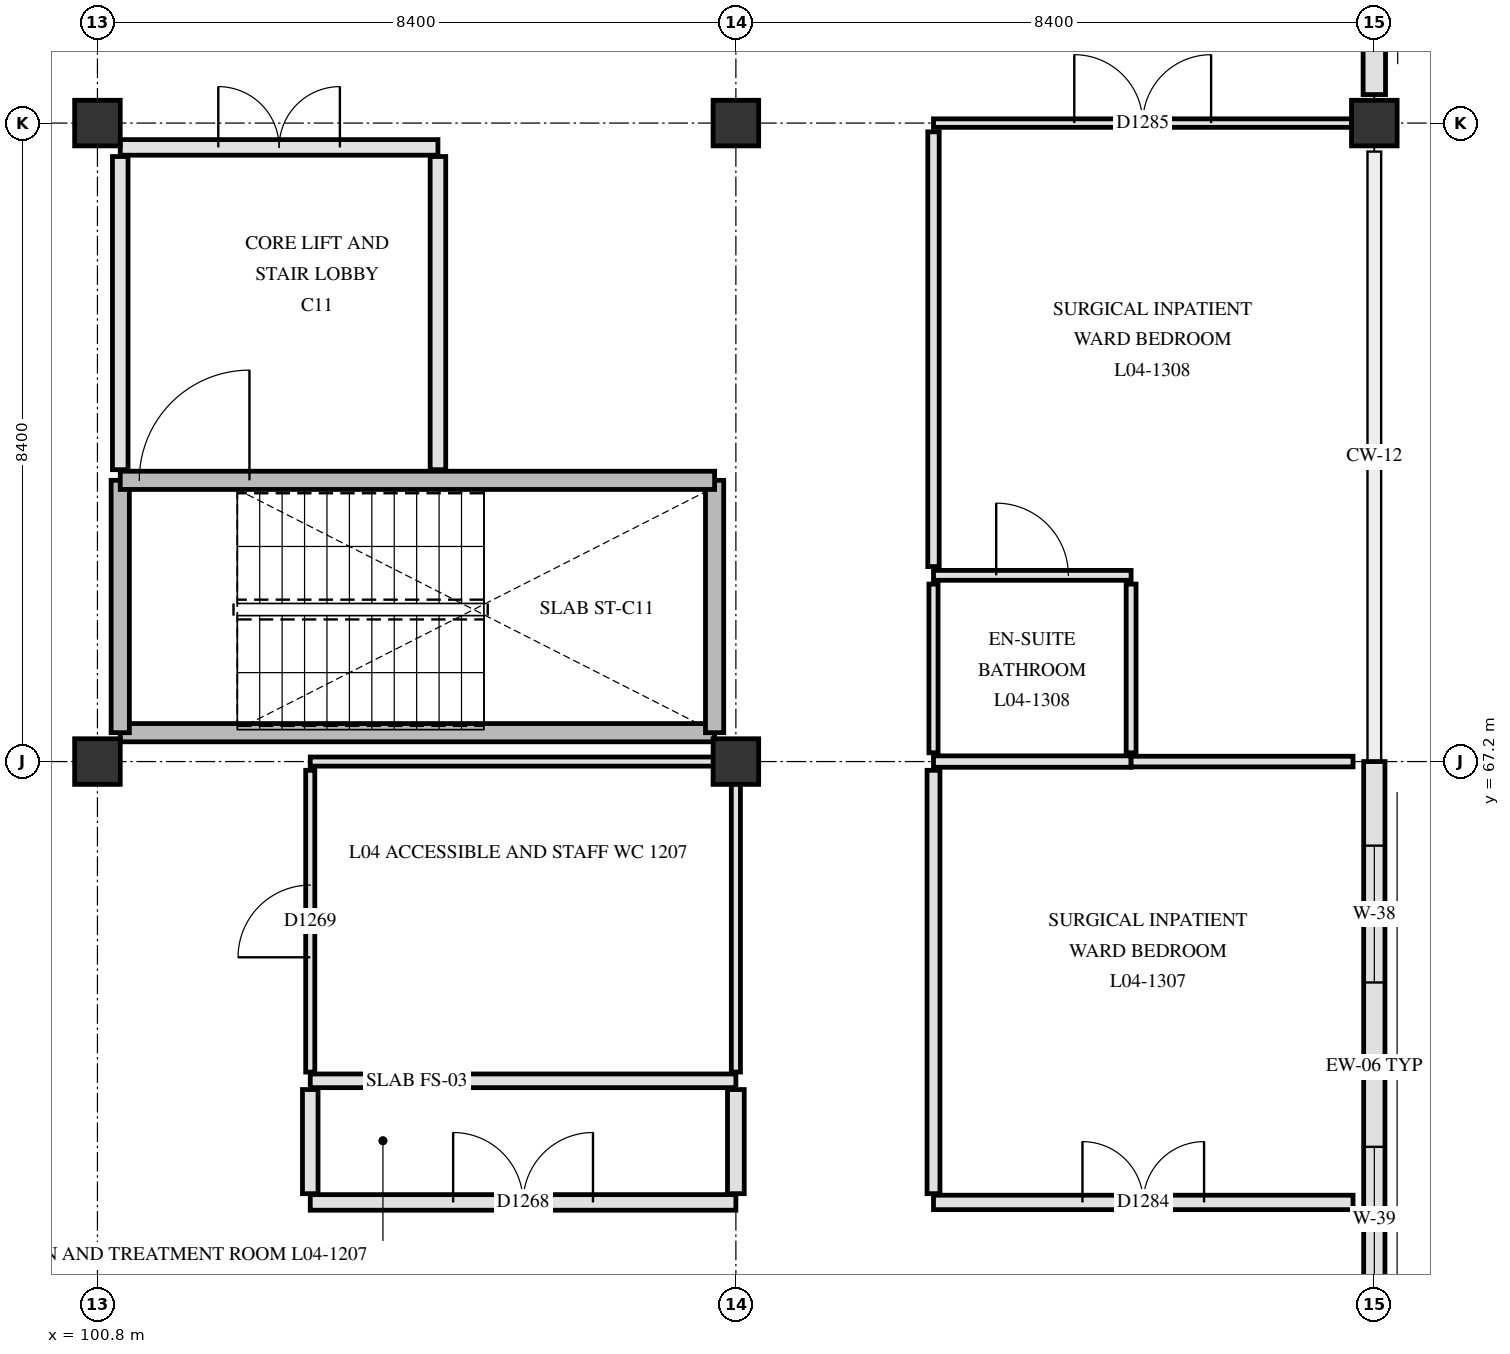
"""IFC4 building model, lengths in metres.
Left out: names, types, materials, properties, quantities, classifications, styles, units other than length and angle.
Written with IfcOpenShell. Run it as: python <this file> out.ifc"""

import sys

from ifc_helpers import new_model, si_unit, direction, frame, frame_2d, origin, origin_2d, place, context, subcontext, project, spatial, rectangle, extrude, element, fill, save


model = new_model("IFC4")
c1 = context("Model", 3, precision=1e-05, world=origin(), true_north=direction((0.0, 1.0)))
c2 = subcontext(c1, "Body", "Model", "MODEL_VIEW")
j1 = project(units=[si_unit("LENGTHUNIT", "METRE"), si_unit("PLANEANGLEUNIT", "RADIAN")], contexts=[c1])
p1 = place(None, origin())
s1 = spatial("IfcSite", under=j1, at=p1, CompositionType="ELEMENT")
p2 = place(p1, origin())
s2 = spatial("IfcBuilding", under=s1, at=p2, CompositionType="ELEMENT")
p3 = place(p2, frame((0.0, 0.0, 18.6)))
s3 = spatial("IfcBuildingStorey", under=s2, at=p3, CompositionType="ELEMENT", Elevation=18.6)
for number, where, z_axis, x_axis in (
    (1, (100.8, 67.2, 0.0), (0.0, 0.0, 1.0), (1.0, 0.0, 0.0)),
    (2, (100.8, 75.6, 0.0), (0.0, 0.0, 1.0), (1.0, 0.0, 0.0)),
    (3, (109.2, 67.2, 0.0), (0.0, 0.0, 1.0), (1.0, 0.0, 0.0)),
    (4, (109.2, 75.6, 0.0), (0.0, 0.0, 1.0), (1.0, 0.0, 0.0)),
    (5, (117.6, 75.6, 0.0), (0.0, 0.0, 1.0), (1.0, 0.0, 0.0)),
):
    element("IfcColumn", number, at=place(p3, frame(where, z_axis=z_axis, x_axis=x_axis)), inside=s3, PredefinedType="COLUMN", context=c2, shape_type="SweptSolid", body=[
        extrude(rectangle(XDim=0.6, YDim=0.6, at=origin_2d()), origin(), (0.0, 0.0, 1.0), 3.9),
    ])
p4 = place(p3, frame((117.6, 83.625, 0.0), z_axis=(0.0, 0.0, 1.0), x_axis=(0.0, -1.0, 0.0)))
e6 = element("IfcWall", 6, at=p4, inside=s3, PredefinedType="SOLIDWALL", context=c2, shape_type="SweptSolid", body=[
    extrude(rectangle(XDim=7.65, YDim=0.295, at=frame_2d((3.825, 0.0))), origin(), (0.0, 0.0, 1.0), 3.31),
])
p5 = place(p4, frame((1.113, 0.0, 0.85)))
e7 = element("IfcOpeningElement", 7, at=p5, cuts=e6, PredefinedType="OPENING", context=c2, shape_type="SweptSolid", body=[
    extrude(rectangle(XDim=1.6, YDim=1.66, at=frame_2d((0.8, 0.83))), frame((0.0, 0.157, 0.0), z_axis=(0.0, -1.0, 0.0), x_axis=(1.0, 0.0, 0.0)), (0.0, 0.0, 1.0), 0.315),
])
p6 = place(p4, frame((4.887, 0.0, 0.85)))
e8 = element("IfcOpeningElement", 8, at=p6, cuts=e6, PredefinedType="OPENING", context=c2, shape_type="SweptSolid", body=[
    extrude(rectangle(XDim=1.7, YDim=1.66, at=frame_2d((0.85, 0.83))), frame((0.0, 0.157, 0.0), z_axis=(0.0, -1.0, 0.0), x_axis=(1.0, 0.0, 0.0)), (0.0, 0.0, 1.0), 0.315),
])
p7 = place(p3, frame((117.6, 67.2, 0.0), z_axis=(0.0, 0.0, 1.0), x_axis=(0.0, -1.0, 0.0)))
e9 = element("IfcWall", 9, at=p7, inside=s3, PredefinedType="SOLIDWALL", context=c2, shape_type="SweptSolid", body=[
    extrude(rectangle(XDim=8.025, YDim=0.28, at=frame_2d((4.012, 0.0))), origin(), (0.0, 0.0, 1.0), 3.11),
])
p8 = place(p7, frame((1.106, 0.0, 0.85)))
e10 = element("IfcOpeningElement", 10, at=p8, cuts=e9, PredefinedType="OPENING", context=c2, shape_type="SweptSolid", body=[
    extrude(rectangle(XDim=1.8, YDim=1.66, at=frame_2d((0.9, 0.83))), frame((0.0, 0.15, 0.0), z_axis=(0.0, -1.0, 0.0), x_axis=(1.0, 0.0, 0.0)), (0.0, 0.0, 1.0), 0.3),
])
p9 = place(p7, frame((5.069, 0.0, 0.85)))
e11 = element("IfcOpeningElement", 11, at=p9, cuts=e9, PredefinedType="OPENING", context=c2, shape_type="SweptSolid", body=[
    extrude(rectangle(XDim=1.9, YDim=1.66, at=frame_2d((0.95, 0.83))), frame((0.0, 0.15, 0.0), z_axis=(0.0, -1.0, 0.0), x_axis=(1.0, 0.0, 0.0)), (0.0, 0.0, 1.0), 0.3),
])
p10 = place(p3, frame((101.1, 67.58, 0.0), z_axis=(0.0, 0.0, 1.0), x_axis=(1.0, 0.0, 0.0)))
e12 = element("IfcWall", 12, at=p10, inside=s3, PredefinedType="SHEAR", context=c2, shape_type="SweptSolid", body=[
    extrude(rectangle(XDim=7.82, YDim=0.24, at=frame_2d((3.91, 0.0))), origin(), (0.0, 0.0, 1.0), 3.62),
])
for number, where, z_axis, x_axis in (
    (13, (101.1, 67.58, 0.0), (0.0, 0.0, 1.0), (0.0, 1.0, 0.0)),
    (14, (108.92, 67.58, 0.0), (0.0, 0.0, 1.0), (0.0, 1.0, 0.0)),
):
    element("IfcWall", number, at=place(p3, frame(where, z_axis=z_axis, x_axis=x_axis)), inside=s3, PredefinedType="SHEAR", context=c2, shape_type="SweptSolid", body=[
        extrude(rectangle(XDim=3.32, YDim=0.24, at=frame_2d((1.66, 0.0))), origin(), (0.0, 0.0, 1.0), 3.62),
    ])
p11 = place(p3, frame((101.1, 70.9, 0.0), z_axis=(0.0, 0.0, 1.0), x_axis=(1.0, 0.0, 0.0)))
e15 = element("IfcWall", 15, at=p11, inside=s3, PredefinedType="SHEAR", context=c2, shape_type="SweptSolid", body=[
    extrude(rectangle(XDim=7.82, YDim=0.24, at=frame_2d((3.91, 0.0))), origin(), (0.0, 0.0, 1.0), 3.62),
])
p12 = place(p11, frame((0.25, 0.0, 0.0)))
e16 = element("IfcOpeningElement", 16, at=p12, cuts=e15, PredefinedType="OPENING", context=c2, shape_type="SweptSolid", body=[
    extrude(rectangle(XDim=1.45, YDim=2.2, at=frame_2d((0.725, 1.1))), frame((0.0, 0.13, 0.0), z_axis=(0.0, -1.0, 0.0), x_axis=(1.0, 0.0, 0.0)), (0.0, 0.0, 1.0), 0.26),
])
for number, where, z_axis, x_axis in (
    (17, (105.28, 71.04, 0.0), (0.0, 0.0, 1.0), (0.0, 1.0, 0.0)),
    (18, (101.1, 71.04, 0.0), (0.0, 0.0, 1.0), (0.0, 1.0, 0.0)),
):
    element("IfcWall", number, at=place(p3, frame(where, z_axis=z_axis, x_axis=x_axis)), inside=s3, PredefinedType="PARTITIONING", context=c2, shape_type="SweptSolid", body=[
        extrude(rectangle(XDim=4.12, YDim=0.205, at=frame_2d((2.06, 0.0))), origin(), (0.0, 0.0, 1.0), 3.61),
    ])
p13 = place(p3, frame((101.1, 75.28, 0.0), z_axis=(0.0, 0.0, 1.0), x_axis=(1.0, 0.0, 0.0)))
e19 = element("IfcWall", 19, at=p13, inside=s3, PredefinedType="PARTITIONING", context=c2, shape_type="SweptSolid", body=[
    extrude(rectangle(XDim=4.18, YDim=0.205, at=frame_2d((2.09, 0.0))), origin(), (0.0, 0.0, 1.0), 3.61),
])
p14 = place(p13, frame((1.29, 0.0, 0.0)))
e20 = element("IfcOpeningElement", 20, at=p14, cuts=e19, PredefinedType="OPENING", context=c2, shape_type="SweptSolid", body=[
    extrude(rectangle(XDim=1.6, YDim=2.25, at=frame_2d((0.8, 1.125))), frame((0.0, 0.113, 0.0), z_axis=(0.0, -1.0, 0.0), x_axis=(1.0, 0.0, 0.0)), (0.0, 0.0, 1.0), 0.225),
])
p15 = place(p3, frame((103.6, 61.4, 0.0), z_axis=(0.0, 0.0, 1.0), x_axis=(1.0, 0.0, 0.0)))
e21 = element("IfcWall", 21, at=p15, inside=s3, PredefinedType="PARTITIONING", context=c2, shape_type="SweptSolid", body=[
    extrude(rectangle(XDim=5.6, YDim=0.205, at=frame_2d((2.8, 0.0))), origin(), (0.0, 0.0, 1.0), 3.26),
])
p16 = place(p15, frame((1.88, 0.0, 0.0)))
e22 = element("IfcOpeningElement", 22, at=p16, cuts=e21, PredefinedType="OPENING", context=c2, shape_type="SweptSolid", body=[
    extrude(rectangle(XDim=1.84, YDim=2.28, at=frame_2d((0.92, 1.14))), frame((0.0, 0.113, 0.0), z_axis=(0.0, -1.0, 0.0), x_axis=(1.0, 0.0, 0.0)), (0.0, 0.0, 1.0), 0.225),
])
p17 = place(p3, frame((111.8, 61.4, 0.0), z_axis=(0.0, 0.0, 1.0), x_axis=(1.0, 0.0, 0.0)))
e23 = element("IfcWall", 23, at=p17, inside=s3, PredefinedType="PARTITIONING", context=c2, shape_type="SweptSolid", body=[
    extrude(rectangle(XDim=5.52, YDim=0.19, at=frame_2d((2.76, 0.0))), origin(), (0.0, 0.0, 1.0), 3.61),
])
p18 = place(p17, frame((1.96, 0.0, 0.0)))
e24 = element("IfcOpeningElement", 24, at=p18, cuts=e23, PredefinedType="OPENING", context=c2, shape_type="SweptSolid", body=[
    extrude(rectangle(XDim=1.6, YDim=2.25, at=frame_2d((0.8, 1.125))), frame((0.0, 0.105, 0.0), z_axis=(0.0, -1.0, 0.0), x_axis=(1.0, 0.0, 0.0)), (0.0, 0.0, 1.0), 0.21),
])
p19 = place(p3, frame((103.6, 63.0, 0.0), z_axis=(0.0, 0.0, 1.0), x_axis=(1.0, 0.0, 0.0)))
e25 = element("IfcWall", 25, at=p19, inside=s3, PredefinedType="PARTITIONING", context=c2, shape_type="SweptSolid", body=[
    extrude(rectangle(XDim=5.6, YDim=0.18, at=frame_2d((2.8, 0.0))), origin(), (0.0, 0.0, 1.0), 3.26),
])
p20 = place(p3, frame((103.6, 67.2, 0.0), z_axis=(0.0, 0.0, 1.0), x_axis=(1.0, 0.0, 0.0)))
e26 = element("IfcWall", 26, at=p20, inside=s3, PredefinedType="PARTITIONING", context=c2, shape_type="SweptSolid", body=[
    extrude(rectangle(XDim=5.305, YDim=0.12, at=frame_2d((2.652, 0.0))), origin(), (0.0, 0.0, 1.0), 3.16),
])
p21 = place(p3, frame((111.8, 67.2, 0.0), z_axis=(0.0, 0.0, 1.0), x_axis=(1.0, 0.0, 0.0)))
e27 = element("IfcWall", 27, at=p21, inside=s3, PredefinedType="PARTITIONING", context=c2, shape_type="SweptSolid", body=[
    extrude(rectangle(XDim=2.6, YDim=0.15, at=frame_2d((1.3, 0.0))), origin(), (0.0, 0.0, 1.0), 3.61),
])
p22 = place(p3, frame((114.4, 67.2, 0.0), z_axis=(0.0, 0.0, 1.0), x_axis=(1.0, 0.0, 0.0)))
e28 = element("IfcWall", 28, at=p22, inside=s3, PredefinedType="PARTITIONING", context=c2, shape_type="SweptSolid", body=[
    extrude(rectangle(XDim=2.92, YDim=0.14, at=frame_2d((1.46, 0.0))), origin(), (0.0, 0.0, 1.0), 3.61),
])
p23 = place(p3, frame((111.8, 69.65, 0.0), z_axis=(0.0, 0.0, 1.0), x_axis=(1.0, 0.0, 0.0)))
e29 = element("IfcWall", 29, at=p23, inside=s3, PredefinedType="PARTITIONING", context=c2, shape_type="SweptSolid", body=[
    extrude(rectangle(XDim=2.6, YDim=0.13, at=frame_2d((1.3, 0.0))), origin(), (0.0, 0.0, 1.0), 3.61),
])
p24 = place(p23, frame((0.825, 0.0, 0.0)))
e30 = element("IfcOpeningElement", 30, at=p24, cuts=e29, PredefinedType="OPENING", context=c2, shape_type="SweptSolid", body=[
    extrude(rectangle(XDim=0.95, YDim=2.1, at=frame_2d((0.475, 1.05))), frame((0.0, 0.075, 0.0), z_axis=(0.0, -1.0, 0.0), x_axis=(1.0, 0.0, 0.0)), (0.0, 0.0, 1.0), 0.15),
])
p25 = place(p3, frame((111.8, 75.6, 0.0), z_axis=(0.0, 0.0, 1.0), x_axis=(1.0, 0.0, 0.0)))
e31 = element("IfcWall", 31, at=p25, inside=s3, PredefinedType="PARTITIONING", context=c2, shape_type="SweptSolid", body=[
    extrude(rectangle(XDim=5.505, YDim=0.112, at=frame_2d((2.752, 0.0))), origin(), (0.0, 0.0, 1.0), 3.16),
])
p26 = place(p25, frame((1.853, 0.0, 0.0)))
e32 = element("IfcOpeningElement", 32, at=p26, cuts=e31, PredefinedType="OPENING", context=c2, shape_type="SweptSolid", body=[
    extrude(rectangle(XDim=1.8, YDim=2.25, at=frame_2d((0.9, 1.125))), frame((0.0, 0.066, 0.0), z_axis=(0.0, -1.0, 0.0), x_axis=(1.0, 0.0, 0.0)), (0.0, 0.0, 1.0), 0.132),
])
p27 = place(p3, frame((103.6, 61.515, 0.0), z_axis=(0.0, 0.0, 1.0), x_axis=(0.0, 1.0, 0.0)))
e33 = element("IfcWall", 33, at=p27, inside=s3, PredefinedType="PARTITIONING", context=c2, shape_type="SweptSolid", body=[
    extrude(rectangle(XDim=1.37, YDim=0.205, at=frame_2d((0.685, 0.0))), origin(), (0.0, 0.0, 1.0), 3.31),
])
p28 = place(p3, frame((103.6, 63.115, 0.0), z_axis=(0.0, 0.0, 1.0), x_axis=(0.0, 1.0, 0.0)))
e34 = element("IfcWall", 34, at=p28, inside=s3, PredefinedType="PARTITIONING", context=c2, shape_type="SweptSolid", body=[
    extrude(rectangle(XDim=3.97, YDim=0.12, at=frame_2d((1.985, 0.0))), origin(), (0.0, 0.0, 1.0), 3.31),
])
p29 = place(p28, frame((1.51, 0.0, 0.0)))
e35 = element("IfcOpeningElement", 35, at=p29, cuts=e34, PredefinedType="OPENING", context=c2, shape_type="SweptSolid", body=[
    extrude(rectangle(XDim=0.95, YDim=2.1, at=frame_2d((0.475, 1.05))), frame((0.0, 0.07, 0.0), z_axis=(0.0, -1.0, 0.0), x_axis=(1.0, 0.0, 0.0)), (0.0, 0.0, 1.0), 0.14),
])
p30 = place(p3, frame((109.2, 61.515, 0.0), z_axis=(0.0, 0.0, 1.0), x_axis=(0.0, 1.0, 0.0)))
e36 = element("IfcWall", 36, at=p30, inside=s3, PredefinedType="PARTITIONING", context=c2, shape_type="SweptSolid", body=[
    extrude(rectangle(XDim=1.37, YDim=0.22, at=frame_2d((0.685, 0.0))), origin(), (0.0, 0.0, 1.0), 3.26),
])
p31 = place(p3, frame((109.2, 63.115, 0.0), z_axis=(0.0, 0.0, 1.0), x_axis=(0.0, 1.0, 0.0)))
e37 = element("IfcWall", 37, at=p31, inside=s3, PredefinedType="PARTITIONING", context=c2, shape_type="SweptSolid", body=[
    extrude(rectangle(XDim=3.79, YDim=0.12, at=frame_2d((1.895, 0.0))), origin(), (0.0, 0.0, 1.0), 3.26),
])
p32 = place(p3, frame((111.8, 61.515, 0.0), z_axis=(0.0, 0.0, 1.0), x_axis=(0.0, 1.0, 0.0)))
e38 = element("IfcWall", 38, at=p32, inside=s3, PredefinedType="PARTITIONING", context=c2, shape_type="SweptSolid", body=[
    extrude(rectangle(XDim=5.57, YDim=0.17, at=frame_2d((2.785, 0.0))), origin(), (0.0, 0.0, 1.0), 3.31),
])
p33 = place(p3, frame((111.8, 67.315, 0.0), z_axis=(0.0, 0.0, 1.0), x_axis=(0.0, 1.0, 0.0)))
e39 = element("IfcWall", 39, at=p33, inside=s3, PredefinedType="PARTITIONING", context=c2, shape_type="SweptSolid", body=[
    extrude(rectangle(XDim=2.22, YDim=0.12, at=frame_2d((1.11, 0.0))), origin(), (0.0, 0.0, 1.0), 3.61),
])
p34 = place(p3, frame((111.8, 69.765, 0.0), z_axis=(0.0, 0.0, 1.0), x_axis=(0.0, 1.0, 0.0)))
e40 = element("IfcWall", 40, at=p34, inside=s3, PredefinedType="PARTITIONING", context=c2, shape_type="SweptSolid", body=[
    extrude(rectangle(XDim=5.72, YDim=0.15, at=frame_2d((2.86, 0.0))), origin(), (0.0, 0.0, 1.0), 3.31),
])
p35 = place(p3, frame((114.4, 67.315, 0.0), z_axis=(0.0, 0.0, 1.0), x_axis=(0.0, 1.0, 0.0)))
e41 = element("IfcWall", 41, at=p35, inside=s3, PredefinedType="PARTITIONING", context=c2, shape_type="SweptSolid", body=[
    extrude(rectangle(XDim=2.22, YDim=0.13, at=frame_2d((1.11, 0.0))), origin(), (0.0, 0.0, 1.0), 3.61),
])
p36 = place(p8, origin())
e42 = element("IfcWindow", 42, at=p36, inside=s3, PartitioningType="SINGLE_PANEL", PredefinedType="WINDOW", context=c2, shape_type="SweptSolid", body=[
    extrude(rectangle(XDim=1.8, YDim=1.66, at=frame_2d((0.9, 0.83))), frame((0.0, 0.03, 0.0), z_axis=(0.0, -1.0, 0.0), x_axis=(1.0, 0.0, 0.0)), (0.0, 0.0, 1.0), 0.06),
])
fill(e10, e42)
p37 = place(p9, origin())
e43 = element("IfcWindow", 43, at=p37, inside=s3, PartitioningType="SINGLE_PANEL", PredefinedType="WINDOW", context=c2, shape_type="SweptSolid", body=[
    extrude(rectangle(XDim=1.9, YDim=1.66, at=frame_2d((0.95, 0.83))), frame((0.0, 0.03, 0.0), z_axis=(0.0, -1.0, 0.0), x_axis=(1.0, 0.0, 0.0)), (0.0, 0.0, 1.0), 0.06),
])
fill(e11, e43)
p38 = place(p12, origin())
e44 = element("IfcDoor", 44, at=p38, inside=s3, OperationType="SINGLE_SWING_RIGHT", PredefinedType="DOOR", context=c2, shape_type="SweptSolid", body=[
    extrude(rectangle(XDim=1.45, YDim=2.2, at=frame_2d((0.725, 1.1))), frame((0.0, 0.025, 0.0), z_axis=(0.0, -1.0, 0.0), x_axis=(1.0, 0.0, 0.0)), (0.0, 0.0, 1.0), 0.05),
])
fill(e16, e44)
p39 = place(p14, origin())
e45 = element("IfcDoor", 45, at=p39, inside=s3, OperationType="DOUBLE_SWING_LEFT", PredefinedType="DOOR", context=c2, shape_type="SweptSolid", body=[
    extrude(rectangle(XDim=1.6, YDim=2.25, at=frame_2d((0.8, 1.125))), frame((0.0, 0.025, 0.0), z_axis=(0.0, -1.0, 0.0), x_axis=(1.0, 0.0, 0.0)), (0.0, 0.0, 1.0), 0.05),
])
fill(e20, e45)
p40 = place(p16, origin())
e46 = element("IfcDoor", 46, at=p40, inside=s3, OperationType="DOUBLE_SWING_LEFT", PredefinedType="DOOR", context=c2, shape_type="SweptSolid", body=[
    extrude(rectangle(XDim=1.84, YDim=2.28, at=frame_2d((0.92, 1.14))), frame((0.0, 0.025, 0.0), z_axis=(0.0, -1.0, 0.0), x_axis=(1.0, 0.0, 0.0)), (0.0, 0.0, 1.0), 0.05),
])
fill(e22, e46)
p41 = place(p29, origin())
e47 = element("IfcDoor", 47, at=p41, inside=s3, OperationType="SINGLE_SWING_LEFT", PredefinedType="DOOR", context=c2, shape_type="SweptSolid", body=[
    extrude(rectangle(XDim=0.95, YDim=2.1, at=frame_2d((0.475, 1.05))), frame((0.0, 0.025, 0.0), z_axis=(0.0, -1.0, 0.0), x_axis=(1.0, 0.0, 0.0)), (0.0, 0.0, 1.0), 0.05),
])
fill(e35, e47)
p42 = place(p18, origin())
e48 = element("IfcDoor", 48, at=p42, inside=s3, OperationType="DOUBLE_SWING_LEFT", PredefinedType="DOOR", context=c2, shape_type="SweptSolid", body=[
    extrude(rectangle(XDim=1.6, YDim=2.25, at=frame_2d((0.8, 1.125))), frame((0.0, 0.025, 0.0), z_axis=(0.0, -1.0, 0.0), x_axis=(1.0, 0.0, 0.0)), (0.0, 0.0, 1.0), 0.05),
])
fill(e24, e48)
p43 = place(p26, origin())
e49 = element("IfcDoor", 49, at=p43, inside=s3, OperationType="DOUBLE_SWING_RIGHT", PredefinedType="DOOR", context=c2, shape_type="SweptSolid", body=[
    extrude(rectangle(XDim=1.8, YDim=2.25, at=frame_2d((0.9, 1.125))), frame((0.0, 0.025, 0.0), z_axis=(0.0, -1.0, 0.0), x_axis=(1.0, 0.0, 0.0)), (0.0, 0.0, 1.0), 0.05),
])
fill(e32, e49)
p44 = place(p24, origin())
e50 = element("IfcDoor", 50, at=p44, inside=s3, OperationType="SINGLE_SWING_LEFT", PredefinedType="DOOR", context=c2, shape_type="SweptSolid", body=[
    extrude(rectangle(XDim=0.95, YDim=2.1, at=frame_2d((0.475, 1.05))), frame((0.0, 0.025, 0.0), z_axis=(0.0, -1.0, 0.0), x_axis=(1.0, 0.0, 0.0)), (0.0, 0.0, 1.0), 0.05),
])
fill(e30, e50)
save(model, sys.argv[1])
